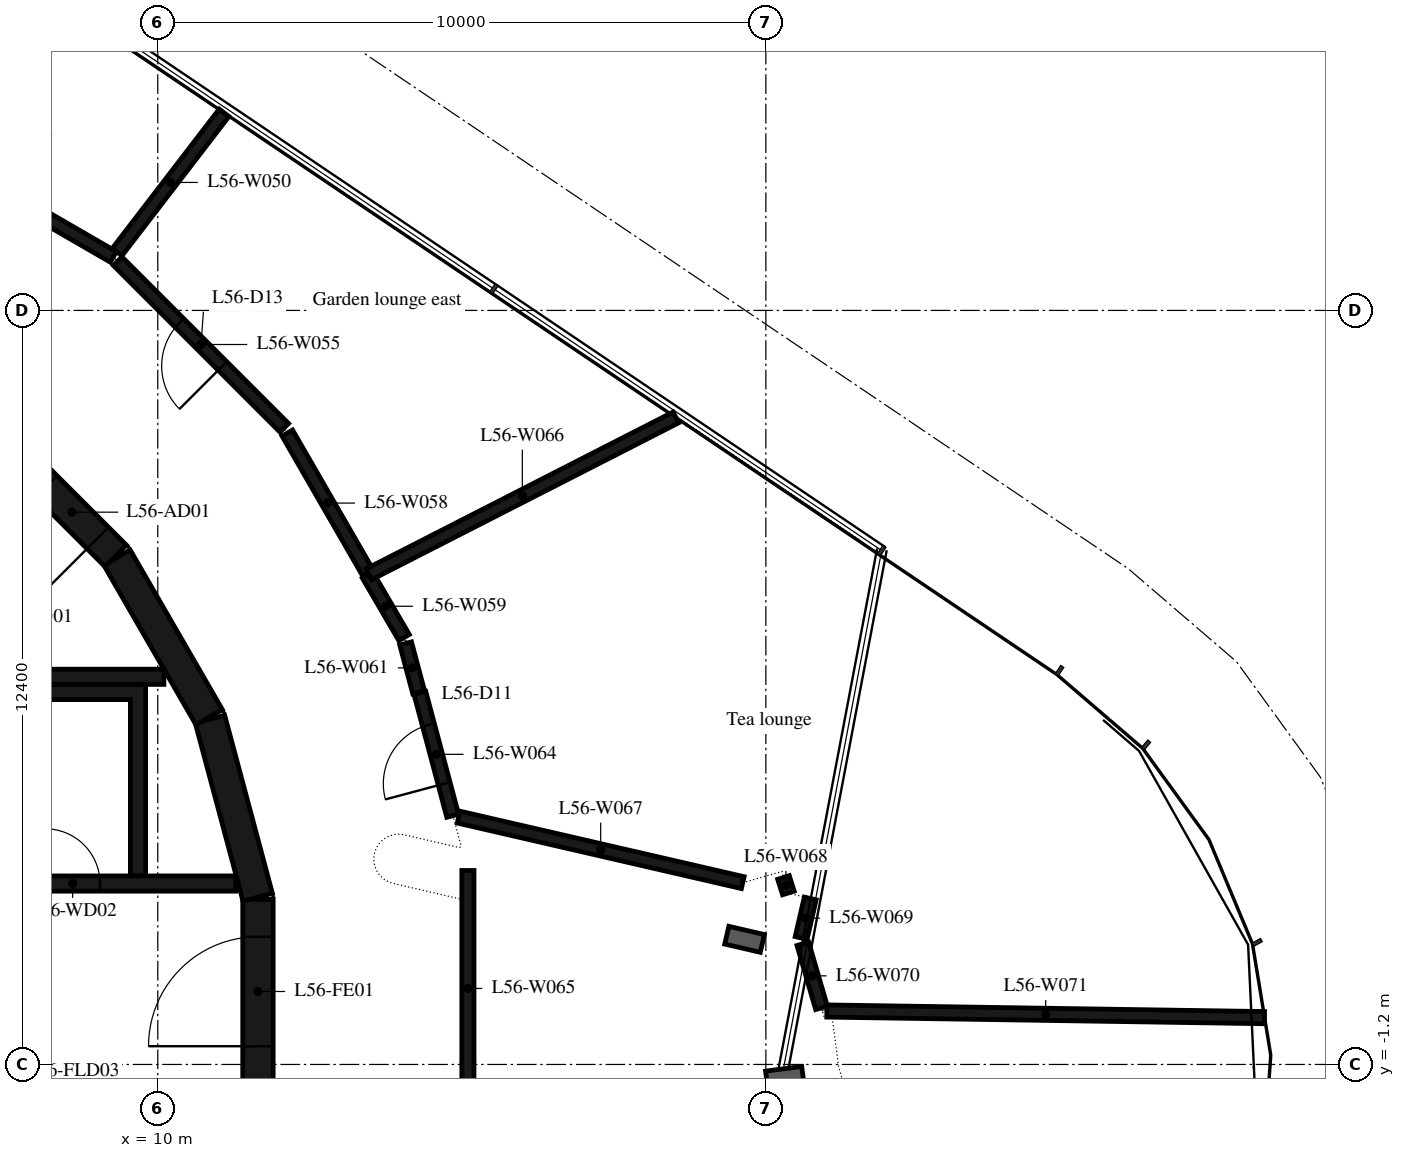
"""IFC4 building model, lengths in metres.
Left out: names, types, materials, properties, quantities, classifications, styles, units other than length and angle.
Written with IfcOpenShell. Run it as: python <this file> out.ifc"""

import sys

from ifc_helpers import new_model, si_unit, direction, frame, frame_2d, origin, place, context, subcontext, project, spatial, polyline, rectangle, outline, extrude, element, fill, save


model = new_model("IFC4")
c1 = context("Model", 3, precision=1e-05, world=origin(), true_north=direction((0.0, 1.0)))
c2 = subcontext(c1, "Body", "Model", "MODEL_VIEW")
j1 = project(units=[si_unit("LENGTHUNIT", "METRE"), si_unit("PLANEANGLEUNIT", "RADIAN")], contexts=[c1])
p1 = place(None, origin())
s1 = spatial("IfcSite", under=j1, at=p1, CompositionType="ELEMENT")
p2 = place(p1, origin())
s2 = spatial("IfcBuilding", under=s1, at=p2, CompositionType="ELEMENT")
p3 = place(p2, frame((0.0, 0.0, 219.9)))
s3 = spatial("IfcBuildingStorey", under=s2, at=p3, CompositionType="ELEMENT", Elevation=219.9)
p4 = place(p3, frame((11.647, -1.516, 0.0), z_axis=(0.0, 0.0, 1.0), x_axis=(0.0, 1.0, 0.0)))
e1 = element("IfcWall", 1, at=p4, inside=s3, PredefinedType="SHEAR", context=c2, shape_type="SweptSolid", body=[
    extrude(rectangle(XDim=3.033, YDim=0.5, at=frame_2d((1.516, 0.0))), origin(), (0.0, 0.0, 1.0), 6.35),
])
p5 = place(p4, frame((0.616, 0.0, 0.0)))
e2 = element("IfcOpeningElement", 2, at=p5, cuts=e1, PredefinedType="OPENING", context=c2, shape_type="SweptSolid", body=[
    extrude(rectangle(XDim=1.8, YDim=2.1, at=frame_2d((0.9, 1.05))), frame((0.0, 0.26, 0.0), z_axis=(0.0, -1.0, 0.0), x_axis=(1.0, 0.0, 0.0)), (0.0, 0.0, 1.0), 0.52),
])
for number, where, z_axis, x_axis in (
    (3, (11.643, 1.55, 0.0), (0.0, 0.0, 1.0), (-0.259, 0.966, 0.0)),
    (4, (10.845, 4.51, 0.0), (0.0, 0.0, 1.0), (-0.5, 0.866, 0.0)),
):
    element("IfcWall", number, at=place(p3, frame(where, z_axis=z_axis, x_axis=x_axis)), inside=s3, PredefinedType="SHEAR", context=c2, shape_type="SweptSolid", body=[
        extrude(rectangle(XDim=3.033, YDim=0.5, at=frame_2d((1.516, 0.0))), origin(), (0.0, 0.0, 1.0), 6.35),
    ])
p6 = place(p3, frame((9.308, 7.164, 0.0), z_axis=(0.0, 0.0, 1.0), x_axis=(-0.707106781187, 0.707106781187, 0.0)))
e5 = element("IfcWall", 5, at=p6, inside=s3, PredefinedType="SHEAR", context=c2, shape_type="SweptSolid", body=[
    extrude(rectangle(XDim=3.032, YDim=0.5, at=frame_2d((1.516, 0.0))), origin(), (0.0, 0.0, 1.0), 6.35),
])
p7 = place(p6, frame((0.416, 0.0, 0.0)))
e6 = element("IfcOpeningElement", 6, at=p7, cuts=e5, PredefinedType="OPENING", context=c2, shape_type="SweptSolid", body=[
    extrude(rectangle(XDim=1.2, YDim=2.1, at=frame_2d((0.6, 1.05))), frame((0.0, 0.26, 0.0), z_axis=(0.0, -1.0, 0.0), x_axis=(1.0, 0.0, 0.0)), (0.0, 0.0, 1.0), 0.52),
])
p8 = place(p3, frame((7.0, 5.175, 0.0), z_axis=(0.0, 0.0, 1.0), x_axis=(1.0, 0.0, 0.0)))
e7 = element("IfcWall", 7, at=p8, inside=s3, PredefinedType="SHEAR", context=c2, shape_type="SweptSolid", body=[
    extrude(rectangle(XDim=3.1, YDim=0.25, at=frame_2d((1.55, 0.0))), origin(), (0.0, 0.0, 1.0), 6.35),
])
p9 = place(p3, origin())
e8 = element("IfcWall", 8, at=p9, inside=s3, PredefinedType="SHEAR", context=c2, shape_type="SweptSolid", body=[
    extrude(outline(polyline([(-9.55, 4.8), (-1.2, 4.8), (-1.2, 1.9), (-0.95, 1.9), (-0.95, 4.8), (0.95, 4.8), (0.95, 1.9), (1.2, 1.9), (1.2, 4.8), (3.1, 4.8), (3.1, 1.9), (3.35, 1.9), (3.35, 4.8), (5.25, 4.8), (5.25, 1.9), (5.5, 1.9), (5.5, 4.8), (7.4, 4.8), (7.4, 1.9), (7.65, 1.9), (7.65, 4.8), (9.55, 4.8), (9.55, 1.9), (9.8, 1.9), (9.8, 4.8), (9.8, 5.05), (-9.8, 5.05), (-9.8, 4.8), (-9.8, 1.9), (-9.55, 1.9), (-9.55, 4.8)])), origin(), (0.0, 0.0, 1.0), 6.35),
])
p10 = place(p3, frame((3.35, 1.775, 0.0), z_axis=(0.0, 0.0, 1.0), x_axis=(1.0, 0.0, 0.0)))
e9 = element("IfcWall", 9, at=p10, inside=s3, PredefinedType="SHEAR", context=c2, shape_type="SweptSolid", body=[
    extrude(rectangle(XDim=7.93, YDim=0.25, at=frame_2d((3.965, 0.0))), origin(), (0.0, 0.0, 1.0), 6.35),
])
p11 = place(p10, frame((0.35, 0.0, 0.0)))
e10 = element("IfcOpeningElement", 10, at=p11, cuts=e9, PredefinedType="OPENING", context=c2, shape_type="SweptSolid", body=[
    extrude(rectangle(XDim=1.2, YDim=2.4, at=frame_2d((0.6, 1.2))), frame((0.0, 0.135, 0.0), z_axis=(0.0, -1.0, 0.0), x_axis=(1.0, 0.0, 0.0)), (0.0, 0.0, 1.0), 0.27),
])
p12 = place(p10, frame((2.5, 0.0, 0.0)))
e11 = element("IfcOpeningElement", 11, at=p12, cuts=e9, PredefinedType="OPENING", context=c2, shape_type="SweptSolid", body=[
    extrude(rectangle(XDim=1.2, YDim=2.4, at=frame_2d((0.6, 1.2))), frame((0.0, 0.135, 0.0), z_axis=(0.0, -1.0, 0.0), x_axis=(1.0, 0.0, 0.0)), (0.0, 0.0, 1.0), 0.27),
])
p13 = place(p10, frame((4.8, 0.0, 0.0)))
e12 = element("IfcOpeningElement", 12, at=p13, cuts=e9, PredefinedType="OPENING", context=c2, shape_type="SweptSolid", body=[
    extrude(rectangle(XDim=0.9, YDim=2.1, at=frame_2d((0.45, 1.05))), frame((0.0, 0.135, 0.0), z_axis=(0.0, -1.0, 0.0), x_axis=(1.0, 0.0, 0.0)), (0.0, 0.0, 1.0), 0.27),
])
p14 = place(p3, frame((9.27, 12.08, 0.0), z_axis=(0.0, 0.0, 1.0), x_axis=(-0.865601686425, 0.500733182901, 0.0)))
e13 = element("IfcWall", 13, at=p14, inside=s3, PredefinedType="PARTITIONING", context=c2, shape_type="SweptSolid", body=[
    extrude(rectangle(XDim=3.874, YDim=0.2, at=frame_2d((1.937, 0.0))), origin(), (0.0, 0.0, 1.0), 6.35),
])
p15 = place(p14, frame((1.437, 0.0, 0.0)))
e14 = element("IfcOpeningElement", 14, at=p15, cuts=e13, PredefinedType="OPENING", context=c2, shape_type="SweptSolid", body=[
    extrude(rectangle(XDim=1.0, YDim=2.1, at=frame_2d((0.5, 1.05))), frame((0.0, 0.11, 0.0), z_axis=(0.0, -1.0, 0.0), x_axis=(1.0, 0.0, 0.0)), (0.0, 0.0, 1.0), 0.22),
])
p16 = place(p3, frame((9.331, 12.159, 0.0), z_axis=(0.0, 0.0, 1.0), x_axis=(0.609130507388, 0.793070000044, 0.0)))
e15 = element("IfcWall", 15, at=p16, inside=s3, PredefinedType="PARTITIONING", context=c2, shape_type="SweptSolid", body=[
    extrude(rectangle(XDim=2.888, YDim=0.2, at=frame_2d((1.444, 0.0))), origin(), (0.0, 0.0, 1.0), 6.35),
])
p17 = place(p3, frame((12.08, 9.27, 0.0), z_axis=(0.0, 0.0, 1.0), x_axis=(-0.707106781187, 0.707106781187, 0.0)))
e16 = element("IfcWall", 16, at=p17, inside=s3, PredefinedType="PARTITIONING", context=c2, shape_type="SweptSolid", body=[
    extrude(rectangle(XDim=3.874, YDim=0.2, at=frame_2d((1.937, 0.0))), origin(), (0.0, 0.0, 1.0), 6.35),
])
p18 = place(p17, frame((1.437, 0.0, 0.0)))
e17 = element("IfcOpeningElement", 17, at=p18, cuts=e16, PredefinedType="OPENING", context=c2, shape_type="SweptSolid", body=[
    extrude(rectangle(XDim=1.0, YDim=2.1, at=frame_2d((0.5, 1.05))), frame((0.0, 0.11, 0.0), z_axis=(0.0, -1.0, 0.0), x_axis=(1.0, 0.0, 0.0)), (0.0, 0.0, 1.0), 0.22),
])
p19 = place(p3, frame((13.458, 6.88, 0.0), z_axis=(0.0, 0.0, 1.0), x_axis=(-0.499635021678, 0.866236021597, 0.0)))
e18 = element("IfcWall", 18, at=p19, inside=s3, PredefinedType="PARTITIONING", context=c2, shape_type="SweptSolid", body=[
    extrude(rectangle(XDim=2.659, YDim=0.2, at=frame_2d((1.33, 0.0))), origin(), (0.0, 0.0, 1.0), 6.35),
])
p20 = place(p3, frame((14.05, 5.82, 0.0), z_axis=(0.0, 0.0, 1.0), x_axis=(-0.503399803142, 0.864053608404, 0.0)))
e19 = element("IfcWall", 19, at=p20, inside=s3, PredefinedType="PARTITIONING", context=c2, shape_type="SweptSolid", body=[
    extrude(rectangle(XDim=1.192, YDim=0.2, at=frame_2d((0.596, 0.0))), origin(), (0.0, 0.0, 1.0), 6.35),
])
p21 = place(p3, frame((14.29, 4.92, 0.0), z_axis=(0.0, 0.0, 1.0), x_axis=(-0.257772288435, 0.966205696172, 0.0)))
e20 = element("IfcWall", 20, at=p21, inside=s3, PredefinedType="PARTITIONING", context=c2, shape_type="SweptSolid", body=[
    extrude(rectangle(XDim=0.832, YDim=0.2, at=frame_2d((0.416, 0.0))), origin(), (0.0, 0.0, 1.0), 6.35),
])
p22 = place(p3, frame((14.85, 2.89, 0.0), z_axis=(0.0, 0.0, 1.0), x_axis=(-0.258273045435, 0.966071961089, 0.0)))
e21 = element("IfcWall", 21, at=p22, inside=s3, PredefinedType="PARTITIONING", context=c2, shape_type="SweptSolid", body=[
    extrude(rectangle(XDim=2.091, YDim=0.2, at=frame_2d((1.045, 0.0))), origin(), (0.0, 0.0, 1.0), 6.35),
])
p23 = place(p22, frame((0.545, 0.0, 0.0)))
e22 = element("IfcOpeningElement", 22, at=p23, cuts=e21, PredefinedType="OPENING", context=c2, shape_type="SweptSolid", body=[
    extrude(rectangle(XDim=1.0, YDim=2.1, at=frame_2d((0.5, 1.05))), frame((0.0, 0.11, 0.0), z_axis=(0.0, -1.0, 0.0), x_axis=(1.0, 0.0, 0.0)), (0.0, 0.0, 1.0), 0.22),
])
p24 = place(p3, frame((15.1, -1.89, 0.0), z_axis=(0.0, 0.0, 1.0), x_axis=(0.0, 1.0, 0.0)))
e23 = element("IfcWall", 23, at=p24, inside=s3, PredefinedType="PARTITIONING", context=c2, shape_type="SweptSolid", body=[
    extrude(rectangle(XDim=3.88, YDim=0.2, at=frame_2d((1.94, 0.0))), origin(), (0.0, 0.0, 1.0), 6.35),
])
p25 = place(p3, frame((18.52, 9.44, 0.0), z_axis=(0.0, 0.0, 1.0), x_axis=(-0.89052771224, -0.454928998561, 0.0)))
e24 = element("IfcWall", 24, at=p25, inside=s3, PredefinedType="PARTITIONING", context=c2, shape_type="SweptSolid", body=[
    extrude(rectangle(XDim=5.671, YDim=0.2, at=frame_2d((2.835, 0.0))), origin(), (0.0, 0.0, 1.0), 6.35),
])
p26 = place(p3, frame((19.62, 1.79, 0.0), z_axis=(0.0, 0.0, 1.0), x_axis=(-0.97443236775, 0.224681019849, 0.0)))
e25 = element("IfcWall", 25, at=p26, inside=s3, PredefinedType="PARTITIONING", context=c2, shape_type="SweptSolid", body=[
    extrude(rectangle(XDim=4.795, YDim=0.2, at=frame_2d((2.397, 0.0))), origin(), (0.0, 0.0, 1.0), 6.35),
])
p27 = place(p3, frame((20.37, 1.62, 0.0), z_axis=(0.0, 0.0, 1.0), x_axis=(-0.30025502813, 0.953858961316, 0.0)))
e26 = element("IfcWall", 26, at=p27, inside=s3, PredefinedType="PARTITIONING", context=c2, shape_type="SweptSolid", body=[
    extrude(rectangle(XDim=0.267, YDim=0.2, at=frame_2d((0.133, 0.0))), origin(), (0.0, 0.0, 1.0), 6.35),
])
p28 = place(p3, frame((20.58, 0.88, 0.0), z_axis=(0.0, 0.0, 1.0), x_axis=(0.224672433131, 0.974434347604, 0.0)))
e27 = element("IfcWall", 27, at=p28, inside=s3, PredefinedType="PARTITIONING", context=c2, shape_type="SweptSolid", body=[
    extrude(rectangle(XDim=0.667, YDim=0.2, at=frame_2d((0.333, 0.0))), origin(), (0.0, 0.0, 1.0), 6.35),
])
p29 = place(p3, frame((20.915, -0.269, 0.0), z_axis=(0.0, 0.0, 1.0), x_axis=(-0.280153802847, 0.959955127467, 0.0)))
e28 = element("IfcWall", 28, at=p29, inside=s3, PredefinedType="PARTITIONING", context=c2, shape_type="SweptSolid", body=[
    extrude(rectangle(XDim=1.097, YDim=0.2, at=frame_2d((0.549, 0.0))), origin(), (0.0, 0.0, 1.0), 6.35),
])
p30 = place(p3, frame((21.004, -0.321, 0.0), z_axis=(0.0, 0.0, 1.0), x_axis=(0.999885546768, -0.01512922221, 0.0)))
e29 = element("IfcWall", 29, at=p30, inside=s3, PredefinedType="PARTITIONING", context=c2, shape_type="SweptSolid", body=[
    extrude(rectangle(XDim=7.197, YDim=0.2, at=frame_2d((3.599, 0.0))), origin(), (0.0, 0.0, 1.0), 6.35),
])
p31 = place(p7, origin())
e30 = element("IfcDoor", 30, at=p31, inside=s3, OperationType="SINGLE_SWING_RIGHT", PredefinedType="DOOR", context=c2, shape_type="SweptSolid", body=[
    extrude(rectangle(XDim=1.2, YDim=2.1, at=frame_2d((0.6, 1.05))), frame((0.0, 0.025, 0.0), z_axis=(0.0, -1.0, 0.0), x_axis=(1.0, 0.0, 0.0)), (0.0, 0.0, 1.0), 0.05),
])
fill(e6, e30)
p32 = place(p5, origin())
e31 = element("IfcDoor", 31, at=p32, inside=s3, OperationType="DOUBLE_DOOR_SINGLE_SWING", PredefinedType="DOOR", context=c2, shape_type="SweptSolid", body=[
    extrude(rectangle(XDim=1.8, YDim=2.1, at=frame_2d((0.9, 1.05))), frame((0.0, 0.025, 0.0), z_axis=(0.0, -1.0, 0.0), x_axis=(1.0, 0.0, 0.0)), (0.0, 0.0, 1.0), 0.05),
])
fill(e2, e31)
p33 = place(p13, origin())
e32 = element("IfcDoor", 32, at=p33, inside=s3, OperationType="SINGLE_SWING_RIGHT", PredefinedType="DOOR", context=c2, shape_type="SweptSolid", body=[
    extrude(rectangle(XDim=0.9, YDim=2.1, at=frame_2d((0.45, 1.05))), frame((0.0, 0.025, 0.0), z_axis=(0.0, -1.0, 0.0), x_axis=(1.0, 0.0, 0.0)), (0.0, 0.0, 1.0), 0.05),
])
fill(e12, e32)
p34 = place(p23, origin())
e33 = element("IfcDoor", 33, at=p34, inside=s3, OperationType="SINGLE_SWING_LEFT", PredefinedType="DOOR", context=c2, shape_type="SweptSolid", body=[
    extrude(rectangle(XDim=1.0, YDim=2.1, at=frame_2d((0.5, 1.05))), frame((0.0, 0.025, 0.0), z_axis=(0.0, -1.0, 0.0), x_axis=(1.0, 0.0, 0.0)), (0.0, 0.0, 1.0), 0.05),
])
fill(e22, e33)
p35 = place(p18, origin())
e34 = element("IfcDoor", 34, at=p35, inside=s3, OperationType="SINGLE_SWING_LEFT", PredefinedType="DOOR", context=c2, shape_type="SweptSolid", body=[
    extrude(rectangle(XDim=1.0, YDim=2.1, at=frame_2d((0.5, 1.05))), frame((0.0, 0.025, 0.0), z_axis=(0.0, -1.0, 0.0), x_axis=(1.0, 0.0, 0.0)), (0.0, 0.0, 1.0), 0.05),
])
fill(e17, e34)
save(model, sys.argv[1])
